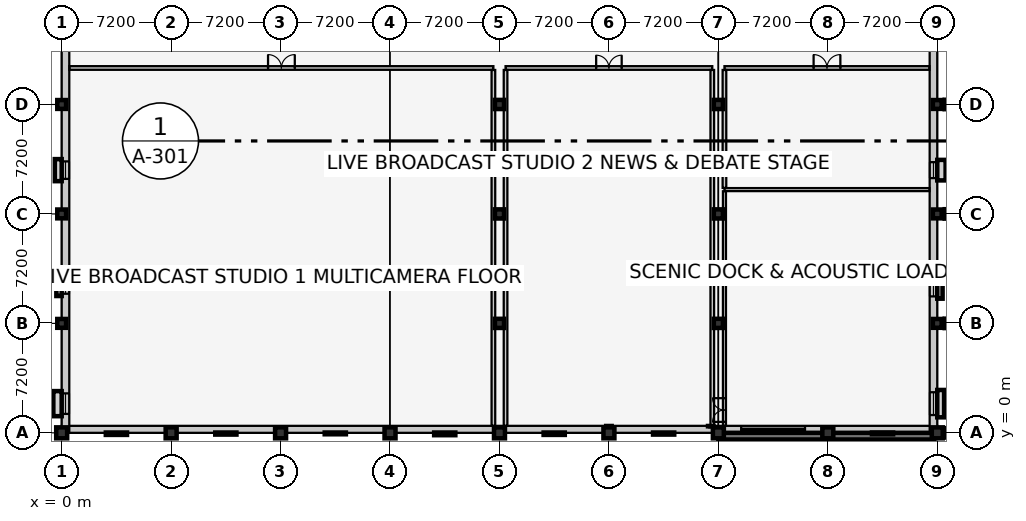
"""IFC4 building model, lengths in metres.
Left out: names, types, materials, properties, quantities, classifications, styles, units other than length and angle.
Written with IfcOpenShell. Run it as: python <this file> out.ifc"""

import sys

from ifc_helpers import new_model, si_unit, direction, frame, frame_2d, origin, origin_with_axes, origin_2d, place, context, subcontext, project, spatial, rectangle, extrude, element, fill, save


model = new_model("IFC4")
c1 = context("Model", 3, precision=1e-05, world=origin(), true_north=direction((0.0, 1.0)))
c2 = subcontext(c1, "Body", "Model", "MODEL_VIEW")
j1 = project(units=[si_unit("LENGTHUNIT", "METRE"), si_unit("PLANEANGLEUNIT", "RADIAN")], contexts=[c1])
p1 = place(None, origin())
s1 = spatial("IfcSite", under=j1, at=p1, CompositionType="ELEMENT")
p2 = place(p1, origin())
s2 = spatial("IfcBuilding", under=s1, at=p2, CompositionType="ELEMENT")
p3 = place(p2, origin())
s3 = spatial("IfcBuildingStorey", under=s2, at=p3, CompositionType="ELEMENT", Elevation=0.0)
p4 = place(p3, origin_with_axes())
e1 = element("IfcColumn", 1, at=p4, inside=s3, PredefinedType="COLUMN", context=c2, shape_type="SweptSolid", body=[
    extrude(rectangle(XDim=0.72, YDim=0.72, at=origin_2d()), origin(), (0.0, 0.0, 1.0), 5.4),
])
for number, where, z_axis, x_axis in (
    (2, (0.0, 7.2, 0.0), (0.0, 0.0, 1.0), (1.0, 0.0, 0.0)),
    (3, (0.0, 14.4, 0.0), (0.0, 0.0, 1.0), (1.0, 0.0, 0.0)),
    (4, (0.0, 21.6, 0.0), (0.0, 0.0, 1.0), (1.0, 0.0, 0.0)),
):
    element("IfcColumn", number, at=place(p3, frame(where, z_axis=z_axis, x_axis=x_axis)), inside=s3, PredefinedType="COLUMN", context=c2, shape_type="SweptSolid", body=[
        extrude(rectangle(XDim=0.58, YDim=0.58, at=origin_2d()), origin(), (0.0, 0.0, 1.0), 5.4),
    ])
for number, where, z_axis, x_axis in (
    (5, (7.2, 0.0, 0.0), (0.0, 0.0, 1.0), (1.0, 0.0, 0.0)),
    (6, (14.4, 0.0, 0.0), (0.0, 0.0, 1.0), (1.0, 0.0, 0.0)),
    (7, (21.6, 0.0, 0.0), (0.0, 0.0, 1.0), (1.0, 0.0, 0.0)),
    (8, (28.8, 0.0, 0.0), (0.0, 0.0, 1.0), (1.0, 0.0, 0.0)),
):
    element("IfcColumn", number, at=place(p3, frame(where, z_axis=z_axis, x_axis=x_axis)), inside=s3, PredefinedType="COLUMN", context=c2, shape_type="SweptSolid", body=[
        extrude(rectangle(XDim=0.72, YDim=0.72, at=origin_2d()), origin(), (0.0, 0.0, 1.0), 5.4),
    ])
for number, where, z_axis, x_axis in (
    (9, (28.8, 7.2, 0.0), (0.0, 0.0, 1.0), (1.0, 0.0, 0.0)),
    (10, (28.8, 14.4, 0.0), (0.0, 0.0, 1.0), (1.0, 0.0, 0.0)),
    (11, (28.8, 21.6, 0.0), (0.0, 0.0, 1.0), (1.0, 0.0, 0.0)),
):
    element("IfcColumn", number, at=place(p3, frame(where, z_axis=z_axis, x_axis=x_axis)), inside=s3, PredefinedType="COLUMN", context=c2, shape_type="SweptSolid", body=[
        extrude(rectangle(XDim=0.6, YDim=0.6, at=origin_2d()), origin(), (0.0, 0.0, 1.0), 5.4),
    ])
for number, where, z_axis, x_axis in (
    (12, (36.0, 0.0, 0.0), (0.0, 0.0, 1.0), (1.0, 0.0, 0.0)),
    (13, (43.2, 0.0, 0.0), (0.0, 0.0, 1.0), (1.0, 0.0, 0.0)),
):
    element("IfcColumn", number, at=place(p3, frame(where, z_axis=z_axis, x_axis=x_axis)), inside=s3, PredefinedType="COLUMN", context=c2, shape_type="SweptSolid", body=[
        extrude(rectangle(XDim=0.72, YDim=0.72, at=origin_2d()), origin(), (0.0, 0.0, 1.0), 5.4),
    ])
for number, where, z_axis, x_axis in (
    (14, (43.2, 7.2, 0.0), (0.0, 0.0, 1.0), (1.0, 0.0, 0.0)),
    (15, (43.2, 14.4, 0.0), (0.0, 0.0, 1.0), (1.0, 0.0, 0.0)),
    (16, (43.2, 21.6, 0.0), (0.0, 0.0, 1.0), (1.0, 0.0, 0.0)),
):
    element("IfcColumn", number, at=place(p3, frame(where, z_axis=z_axis, x_axis=x_axis)), inside=s3, PredefinedType="COLUMN", context=c2, shape_type="SweptSolid", body=[
        extrude(rectangle(XDim=0.6, YDim=0.6, at=origin_2d()), origin(), (0.0, 0.0, 1.0), 5.4),
    ])
for number, where, z_axis, x_axis in (
    (17, (50.4, 0.0, 0.0), (0.0, 0.0, 1.0), (1.0, 0.0, 0.0)),
    (18, (57.6, 0.0, 0.0), (0.0, 0.0, 1.0), (1.0, 0.0, 0.0)),
):
    element("IfcColumn", number, at=place(p3, frame(where, z_axis=z_axis, x_axis=x_axis)), inside=s3, PredefinedType="COLUMN", context=c2, shape_type="SweptSolid", body=[
        extrude(rectangle(XDim=0.72, YDim=0.72, at=origin_2d()), origin(), (0.0, 0.0, 1.0), 5.4),
    ])
for number, where, z_axis, x_axis in (
    (19, (57.6, 7.2, 0.0), (0.0, 0.0, 1.0), (1.0, 0.0, 0.0)),
    (20, (57.6, 14.4, 0.0), (0.0, 0.0, 1.0), (1.0, 0.0, 0.0)),
    (21, (57.6, 21.6, 0.0), (0.0, 0.0, 1.0), (1.0, 0.0, 0.0)),
):
    element("IfcColumn", number, at=place(p3, frame(where, z_axis=z_axis, x_axis=x_axis)), inside=s3, PredefinedType="COLUMN", context=c2, shape_type="SweptSolid", body=[
        extrude(rectangle(XDim=0.58, YDim=0.58, at=origin_2d()), origin(), (0.0, 0.0, 1.0), 5.4),
    ])
for number, where, z_axis, x_axis in (
    (22, (58.4, 0.0, 0.0), (0.0, 0.0, 1.0), (1.0, 0.0, 0.0)),
    (23, (58.4, 7.2, 0.0), (0.0, 0.0, 1.0), (1.0, 0.0, 0.0)),
    (24, (58.4, 14.4, 0.0), (0.0, 0.0, 1.0), (1.0, 0.0, 0.0)),
    (25, (58.4, 21.6, 0.0), (0.0, 0.0, 1.0), (1.0, 0.0, 0.0)),
):
    element("IfcColumn", number, at=place(p3, frame(where, z_axis=z_axis, x_axis=x_axis)), inside=s3, PredefinedType="COLUMN", context=c2, shape_type="SweptSolid", body=[
        extrude(rectangle(XDim=0.62, YDim=0.62, at=origin_2d()), origin(), (0.0, 0.0, 1.0), 5.4),
    ])
p5 = place(p3, frame((57.6, 0.23, 0.0), z_axis=(0.0, 0.0, 1.0), x_axis=(-1.0, 0.0, 0.0)))
e26 = element("IfcWall", 26, at=p5, inside=s3, PredefinedType="SOLIDWALL", context=c2, shape_type="SweptSolid", body=[
    extrude(rectangle(XDim=57.6, YDim=0.46, at=frame_2d((28.8, 0.0))), origin(), (0.0, 0.0, 1.0), 5.4),
])
p6 = place(p5, frame((8.7, 0.0, 0.0)))
e27 = element("IfcOpeningElement", 27, at=p6, cuts=e26, PredefinedType="OPENING", context=c2, shape_type="SweptSolid", body=[
    extrude(rectangle(XDim=4.2, YDim=4.8, at=frame_2d((2.1, 2.4))), frame((0.0, 0.242, 0.0), z_axis=(0.0, -1.0, 0.0), x_axis=(1.0, 0.0, 0.0)), (0.0, 0.0, 1.0), 0.484),
])
p7 = place(p3, frame((57.35, 38.4, 0.0), z_axis=(0.0, 0.0, 1.0), x_axis=(0.0, -1.0, 0.0)))
e28 = element("IfcWall", 28, at=p7, inside=s3, PredefinedType="SOLIDWALL", context=c2, shape_type="SweptSolid", body=[
    extrude(rectangle(XDim=38.4, YDim=0.5, at=frame_2d((19.2, 0.0))), origin(), (0.0, 0.0, 1.0), 4.255),
])
p8 = place(p7, frame((10.9, 0.0, 0.0)))
e29 = element("IfcOpeningElement", 29, at=p8, cuts=e28, PredefinedType="OPENING", context=c2, shape_type="SweptSolid", body=[
    extrude(rectangle(XDim=2.2, YDim=2.4, at=frame_2d((1.1, 1.2))), frame((0.0, 0.262, 0.0), z_axis=(0.0, -1.0, 0.0), x_axis=(1.0, 0.0, 0.0)), (0.0, 0.0, 1.0), 0.524),
])
p9 = place(p7, frame((1.345, 0.0, 0.9)))
e30 = element("IfcOpeningElement", 30, at=p9, cuts=e28, PredefinedType="OPENING", context=c2, shape_type="SweptSolid", body=[
    extrude(rectangle(XDim=1.15, YDim=1.45, at=frame_2d((0.575, 0.725))), frame((0.0, 0.262, 0.0), z_axis=(0.0, -1.0, 0.0), x_axis=(1.0, 0.0, 0.0)), (0.0, 0.0, 1.0), 0.524),
])
p10 = place(p7, frame((5.135, 0.0, 0.9)))
e31 = element("IfcOpeningElement", 31, at=p10, cuts=e28, PredefinedType="OPENING", context=c2, shape_type="SweptSolid", body=[
    extrude(rectangle(XDim=1.25, YDim=1.45, at=frame_2d((0.625, 0.725))), frame((0.0, 0.262, 0.0), z_axis=(0.0, -1.0, 0.0), x_axis=(1.0, 0.0, 0.0)), (0.0, 0.0, 1.0), 0.524),
])
p11 = place(p7, frame((20.595, 0.0, 0.9)))
e32 = element("IfcOpeningElement", 32, at=p11, cuts=e28, PredefinedType="OPENING", context=c2, shape_type="SweptSolid", body=[
    extrude(rectangle(XDim=1.05, YDim=1.6, at=frame_2d((0.525, 0.8))), frame((0.0, 0.262, 0.0), z_axis=(0.0, -1.0, 0.0), x_axis=(1.0, 0.0, 0.0)), (0.0, 0.0, 1.0), 0.524),
])
p12 = place(p7, frame((28.175, 0.0, 0.9)))
e33 = element("IfcOpeningElement", 33, at=p12, cuts=e28, PredefinedType="OPENING", context=c2, shape_type="SweptSolid", body=[
    extrude(rectangle(XDim=1.25, YDim=1.6, at=frame_2d((0.625, 0.8))), frame((0.0, 0.262, 0.0), z_axis=(0.0, -1.0, 0.0), x_axis=(1.0, 0.0, 0.0)), (0.0, 0.0, 1.0), 0.524),
])
p13 = place(p7, frame((35.73, 0.0, 0.9)))
e34 = element("IfcOpeningElement", 34, at=p13, cuts=e28, PredefinedType="OPENING", context=c2, shape_type="SweptSolid", body=[
    extrude(rectangle(XDim=1.5, YDim=1.6, at=frame_2d((0.75, 0.8))), frame((0.0, 0.262, 0.0), z_axis=(0.0, -1.0, 0.0), x_axis=(1.0, 0.0, 0.0)), (0.0, 0.0, 1.0), 0.524),
])
p14 = place(p3, frame((0.25, 0.0, 0.0), z_axis=(0.0, 0.0, 1.0), x_axis=(0.0, 1.0, 0.0)))
e35 = element("IfcWall", 35, at=p14, inside=s3, PredefinedType="SOLIDWALL", context=c2, shape_type="SweptSolid", body=[
    extrude(rectangle(XDim=38.4, YDim=0.5, at=frame_2d((19.2, 0.0))), origin(), (0.0, 0.0, 1.0), 4.255),
])
p15 = place(p14, frame((25.4, 0.0, 0.0)))
e36 = element("IfcOpeningElement", 36, at=p15, cuts=e35, PredefinedType="OPENING", context=c2, shape_type="SweptSolid", body=[
    extrude(rectangle(XDim=2.0, YDim=2.35, at=frame_2d((1.0, 1.175))), frame((0.0, 0.262, 0.0), z_axis=(0.0, -1.0, 0.0), x_axis=(1.0, 0.0, 0.0)), (0.0, 0.0, 1.0), 0.524),
])
p16 = place(p14, frame((1.245, 0.0, 0.9)))
e37 = element("IfcOpeningElement", 37, at=p16, cuts=e35, PredefinedType="OPENING", context=c2, shape_type="SweptSolid", body=[
    extrude(rectangle(XDim=1.35, YDim=1.45, at=frame_2d((0.675, 0.725))), frame((0.0, 0.262, 0.0), z_axis=(0.0, -1.0, 0.0), x_axis=(1.0, 0.0, 0.0)), (0.0, 0.0, 1.0), 0.524),
])
p17 = place(p14, frame((9.15, 0.0, 0.9)))
e38 = element("IfcOpeningElement", 38, at=p17, cuts=e35, PredefinedType="OPENING", context=c2, shape_type="SweptSolid", body=[
    extrude(rectangle(XDim=0.9, YDim=1.6, at=frame_2d((0.45, 0.8))), frame((0.0, 0.262, 0.0), z_axis=(0.0, -1.0, 0.0), x_axis=(1.0, 0.0, 0.0)), (0.0, 0.0, 1.0), 0.524),
])
p18 = place(p14, frame((16.705, 0.0, 0.9)))
e39 = element("IfcOpeningElement", 39, at=p18, cuts=e35, PredefinedType="OPENING", context=c2, shape_type="SweptSolid", body=[
    extrude(rectangle(XDim=1.15, YDim=1.6, at=frame_2d((0.575, 0.8))), frame((0.0, 0.262, 0.0), z_axis=(0.0, -1.0, 0.0), x_axis=(1.0, 0.0, 0.0)), (0.0, 0.0, 1.0), 0.524),
])
p19 = place(p14, frame((32.14, 0.0, 0.9)))
e40 = element("IfcOpeningElement", 40, at=p19, cuts=e35, PredefinedType="OPENING", context=c2, shape_type="SweptSolid", body=[
    extrude(rectangle(XDim=1.0, YDim=1.75, at=frame_2d((0.5, 0.875))), frame((0.0, 0.262, 0.0), z_axis=(0.0, -1.0, 0.0), x_axis=(1.0, 0.0, 0.0)), (0.0, 0.0, 1.0), 0.524),
])
p20 = place(p14, frame((35.92, 0.0, 0.9)))
e41 = element("IfcOpeningElement", 41, at=p20, cuts=e35, PredefinedType="OPENING", context=c2, shape_type="SweptSolid", body=[
    extrude(rectangle(XDim=1.12, YDim=1.75, at=frame_2d((0.56, 0.875))), frame((0.0, 0.262, 0.0), z_axis=(0.0, -1.0, 0.0), x_axis=(1.0, 0.0, 0.0)), (0.0, 0.0, 1.0), 0.524),
])
p21 = place(p3, frame((43.2, -0.22, -0.8), z_axis=(0.0, 0.0, 1.0), x_axis=(1.0, 0.0, 0.0)))
e42 = element("IfcWall", 42, at=p21, inside=s3, PredefinedType="USERDEFINED", context=c2, shape_type="SweptSolid", body=[
    extrude(rectangle(XDim=14.2, YDim=0.44, at=frame_2d((7.1, 0.0))), origin(), (0.0, 0.0, 1.0), 1.3),
])
p22 = place(p3, frame((0.51, 24.0, 0.0), z_axis=(0.0, 0.0, 1.0), x_axis=(1.0, 0.0, 0.0)))
e43 = element("IfcWall", 43, at=p22, inside=s3, PredefinedType="PARTITIONING", context=c2, shape_type="SweptSolid", body=[
    extrude(rectangle(XDim=27.89, YDim=0.24, at=frame_2d((13.945, 0.0))), origin(), (0.0, 0.0, 1.0), 5.15),
])
p23 = place(p22, frame((13.065, 0.0, 0.0)))
e44 = element("IfcOpeningElement", 44, at=p23, cuts=e43, PredefinedType="OPENING", context=c2, shape_type="SweptSolid", body=[
    extrude(rectangle(XDim=1.76, YDim=2.3, at=frame_2d((0.88, 1.15))), frame((0.0, 0.132, 0.0), z_axis=(0.0, -1.0, 0.0), x_axis=(1.0, 0.0, 0.0)), (0.0, 0.0, 1.0), 0.264),
])
p24 = place(p3, frame((28.4, 0.47, 0.0), z_axis=(0.0, 0.0, 1.0), x_axis=(0.0, 1.0, 0.0)))
e45 = element("IfcWall", 45, at=p24, inside=s3, PredefinedType="PARTITIONING", context=c2, shape_type="SweptSolid", body=[
    extrude(rectangle(XDim=23.4, YDim=0.24, at=frame_2d((11.7, 0.0))), origin(), (0.0, 0.0, 1.0), 5.15),
])
p25 = place(p3, frame((29.2, 24.0, 0.0), z_axis=(0.0, 0.0, 1.0), x_axis=(1.0, 0.0, 0.0)))
e46 = element("IfcWall", 46, at=p25, inside=s3, PredefinedType="PARTITIONING", context=c2, shape_type="SweptSolid", body=[
    extrude(rectangle(XDim=13.6, YDim=0.24, at=frame_2d((6.8, 0.0))), origin(), (0.0, 0.0, 1.0), 5.15),
])
p26 = place(p25, frame((5.96, 0.0, 0.0)))
e47 = element("IfcOpeningElement", 47, at=p26, cuts=e46, PredefinedType="OPENING", context=c2, shape_type="SweptSolid", body=[
    extrude(rectangle(XDim=1.68, YDim=2.3, at=frame_2d((0.84, 1.15))), frame((0.0, 0.132, 0.0), z_axis=(0.0, -1.0, 0.0), x_axis=(1.0, 0.0, 0.0)), (0.0, 0.0, 1.0), 0.264),
])
for number, where, z_axis, x_axis in (
    (48, (29.2, 0.47, 0.0), (0.0, 0.0, 1.0), (0.0, 1.0, 0.0)),
    (49, (42.8, 0.47, 0.0), (0.0, 0.0, 1.0), (0.0, 1.0, 0.0)),
):
    element("IfcWall", number, at=place(p3, frame(where, z_axis=z_axis, x_axis=x_axis)), inside=s3, PredefinedType="PARTITIONING", context=c2, shape_type="SweptSolid", body=[
        extrude(rectangle(XDim=23.4, YDim=0.24, at=frame_2d((11.7, 0.0))), origin(), (0.0, 0.0, 1.0), 5.15),
    ])
p27 = place(p3, frame((43.6, 16.0, 0.0), z_axis=(0.0, 0.0, 1.0), x_axis=(1.0, 0.0, 0.0)))
e50 = element("IfcWall", 50, at=p27, inside=s3, PredefinedType="PARTITIONING", context=c2, shape_type="SweptSolid", body=[
    extrude(rectangle(XDim=13.49, YDim=0.2, at=frame_2d((6.745, 0.0))), origin(), (0.0, 0.0, 1.0), 5.15),
])
p28 = place(p3, frame((43.6, 0.47, 0.0), z_axis=(0.0, 0.0, 1.0), x_axis=(0.0, 1.0, 0.0)))
e51 = element("IfcWall", 51, at=p28, inside=s3, PredefinedType="PARTITIONING", context=c2, shape_type="SweptSolid", body=[
    extrude(rectangle(XDim=15.42, YDim=0.2, at=frame_2d((7.71, 0.0))), origin(), (0.0, 0.0, 1.0), 5.15),
])
p29 = place(p28, frame((0.25, 0.0, 0.0)))
e52 = element("IfcOpeningElement", 52, at=p29, cuts=e51, PredefinedType="OPENING", context=c2, shape_type="SweptSolid", body=[
    extrude(rectangle(XDim=1.56, YDim=2.25, at=frame_2d((0.78, 1.125))), frame((0.0, 0.112, 0.0), z_axis=(0.0, -1.0, 0.0), x_axis=(1.0, 0.0, 0.0)), (0.0, 0.0, 1.0), 0.224),
])
p30 = place(p3, frame((43.6, 24.0, 0.0), z_axis=(0.0, 0.0, 1.0), x_axis=(1.0, 0.0, 0.0)))
e53 = element("IfcWall", 53, at=p30, inside=s3, PredefinedType="PARTITIONING", context=c2, shape_type="SweptSolid", body=[
    extrude(rectangle(XDim=13.49, YDim=0.24, at=frame_2d((6.745, 0.0))), origin(), (0.0, 0.0, 1.0), 5.15),
])
p31 = place(p30, frame((5.865, 0.0, 0.0)))
e54 = element("IfcOpeningElement", 54, at=p31, cuts=e53, PredefinedType="OPENING", context=c2, shape_type="SweptSolid", body=[
    extrude(rectangle(XDim=1.76, YDim=2.3, at=frame_2d((0.88, 1.15))), frame((0.0, 0.132, 0.0), z_axis=(0.0, -1.0, 0.0), x_axis=(1.0, 0.0, 0.0)), (0.0, 0.0, 1.0), 0.264),
])
p32 = place(p3, frame((43.6, 16.11, 0.0), z_axis=(0.0, 0.0, 1.0), x_axis=(0.0, 1.0, 0.0)))
e55 = element("IfcWall", 55, at=p32, inside=s3, PredefinedType="PARTITIONING", context=c2, shape_type="SweptSolid", body=[
    extrude(rectangle(XDim=7.76, YDim=0.24, at=frame_2d((3.88, 0.0))), origin(), (0.0, 0.0, 1.0), 5.15),
])
p33 = place(p6, origin())
e56 = element("IfcDoor", 56, at=p33, inside=s3, OperationType="ROLLINGUP", PredefinedType="GATE", context=c2, shape_type="SweptSolid", body=[
    extrude(rectangle(XDim=4.2, YDim=4.8, at=frame_2d((2.1, 2.4))), frame((0.0, 0.025, 0.0), z_axis=(0.0, -1.0, 0.0), x_axis=(1.0, 0.0, 0.0)), (0.0, 0.0, 1.0), 0.05),
])
fill(e27, e56)
p34 = place(p11, origin())
e57 = element("IfcWindow", 57, at=p34, inside=s3, PartitioningType="SINGLE_PANEL", PredefinedType="WINDOW", context=c2, shape_type="SweptSolid", body=[
    extrude(rectangle(XDim=1.05, YDim=1.6, at=frame_2d((0.525, 0.8))), frame((0.0, 0.03, 0.0), z_axis=(0.0, -1.0, 0.0), x_axis=(1.0, 0.0, 0.0)), (0.0, 0.0, 1.0), 0.06),
])
fill(e32, e57)
p35 = place(p12, origin())
e58 = element("IfcWindow", 58, at=p35, inside=s3, PartitioningType="SINGLE_PANEL", PredefinedType="WINDOW", context=c2, shape_type="SweptSolid", body=[
    extrude(rectangle(XDim=1.25, YDim=1.6, at=frame_2d((0.625, 0.8))), frame((0.0, 0.03, 0.0), z_axis=(0.0, -1.0, 0.0), x_axis=(1.0, 0.0, 0.0)), (0.0, 0.0, 1.0), 0.06),
])
fill(e33, e58)
p36 = place(p13, origin())
e59 = element("IfcWindow", 59, at=p36, inside=s3, PartitioningType="SINGLE_PANEL", PredefinedType="WINDOW", context=c2, shape_type="SweptSolid", body=[
    extrude(rectangle(XDim=1.5, YDim=1.6, at=frame_2d((0.75, 0.8))), frame((0.0, 0.03, 0.0), z_axis=(0.0, -1.0, 0.0), x_axis=(1.0, 0.0, 0.0)), (0.0, 0.0, 1.0), 0.06),
])
fill(e34, e59)
p37 = place(p16, origin())
e60 = element("IfcWindow", 60, at=p37, inside=s3, PartitioningType="SINGLE_PANEL", PredefinedType="WINDOW", context=c2, shape_type="SweptSolid", body=[
    extrude(rectangle(XDim=1.35, YDim=1.45, at=frame_2d((0.675, 0.725))), frame((0.0, 0.03, 0.0), z_axis=(0.0, -1.0, 0.0), x_axis=(1.0, 0.0, 0.0)), (0.0, 0.0, 1.0), 0.06),
])
fill(e37, e60)
p38 = place(p17, origin())
e61 = element("IfcWindow", 61, at=p38, inside=s3, PartitioningType="SINGLE_PANEL", PredefinedType="WINDOW", context=c2, shape_type="SweptSolid", body=[
    extrude(rectangle(XDim=0.9, YDim=1.6, at=frame_2d((0.45, 0.8))), frame((0.0, 0.03, 0.0), z_axis=(0.0, -1.0, 0.0), x_axis=(1.0, 0.0, 0.0)), (0.0, 0.0, 1.0), 0.06),
])
fill(e38, e61)
p39 = place(p18, origin())
e62 = element("IfcWindow", 62, at=p39, inside=s3, PartitioningType="SINGLE_PANEL", PredefinedType="WINDOW", context=c2, shape_type="SweptSolid", body=[
    extrude(rectangle(XDim=1.15, YDim=1.6, at=frame_2d((0.575, 0.8))), frame((0.0, 0.03, 0.0), z_axis=(0.0, -1.0, 0.0), x_axis=(1.0, 0.0, 0.0)), (0.0, 0.0, 1.0), 0.06),
])
fill(e39, e62)
p40 = place(p23, origin())
e63 = element("IfcDoor", 63, at=p40, inside=s3, OperationType="DOUBLE_DOOR_SINGLE_SWING", PredefinedType="DOOR", context=c2, shape_type="SweptSolid", body=[
    extrude(rectangle(XDim=1.76, YDim=2.3, at=frame_2d((0.88, 1.15))), frame((0.0, 0.025, 0.0), z_axis=(0.0, -1.0, 0.0), x_axis=(1.0, 0.0, 0.0)), (0.0, 0.0, 1.0), 0.05),
])
fill(e44, e63)
p41 = place(p26, origin())
e64 = element("IfcDoor", 64, at=p41, inside=s3, OperationType="DOUBLE_DOOR_SINGLE_SWING", PredefinedType="DOOR", context=c2, shape_type="SweptSolid", body=[
    extrude(rectangle(XDim=1.68, YDim=2.3, at=frame_2d((0.84, 1.15))), frame((0.0, 0.025, 0.0), z_axis=(0.0, -1.0, 0.0), x_axis=(1.0, 0.0, 0.0)), (0.0, 0.0, 1.0), 0.05),
])
fill(e47, e64)
p42 = place(p29, origin())
e65 = element("IfcDoor", 65, at=p42, inside=s3, OperationType="DOUBLE_DOOR_SINGLE_SWING", PredefinedType="DOOR", context=c2, shape_type="SweptSolid", body=[
    extrude(rectangle(XDim=1.56, YDim=2.25, at=frame_2d((0.78, 1.125))), frame((0.0, 0.025, 0.0), z_axis=(0.0, -1.0, 0.0), x_axis=(1.0, 0.0, 0.0)), (0.0, 0.0, 1.0), 0.05),
])
fill(e52, e65)
p43 = place(p31, origin())
e66 = element("IfcDoor", 66, at=p43, inside=s3, OperationType="DOUBLE_DOOR_SINGLE_SWING", PredefinedType="DOOR", context=c2, shape_type="SweptSolid", body=[
    extrude(rectangle(XDim=1.76, YDim=2.3, at=frame_2d((0.88, 1.15))), frame((0.0, 0.025, 0.0), z_axis=(0.0, -1.0, 0.0), x_axis=(1.0, 0.0, 0.0)), (0.0, 0.0, 1.0), 0.05),
])
fill(e54, e66)
save(model, sys.argv[1])
